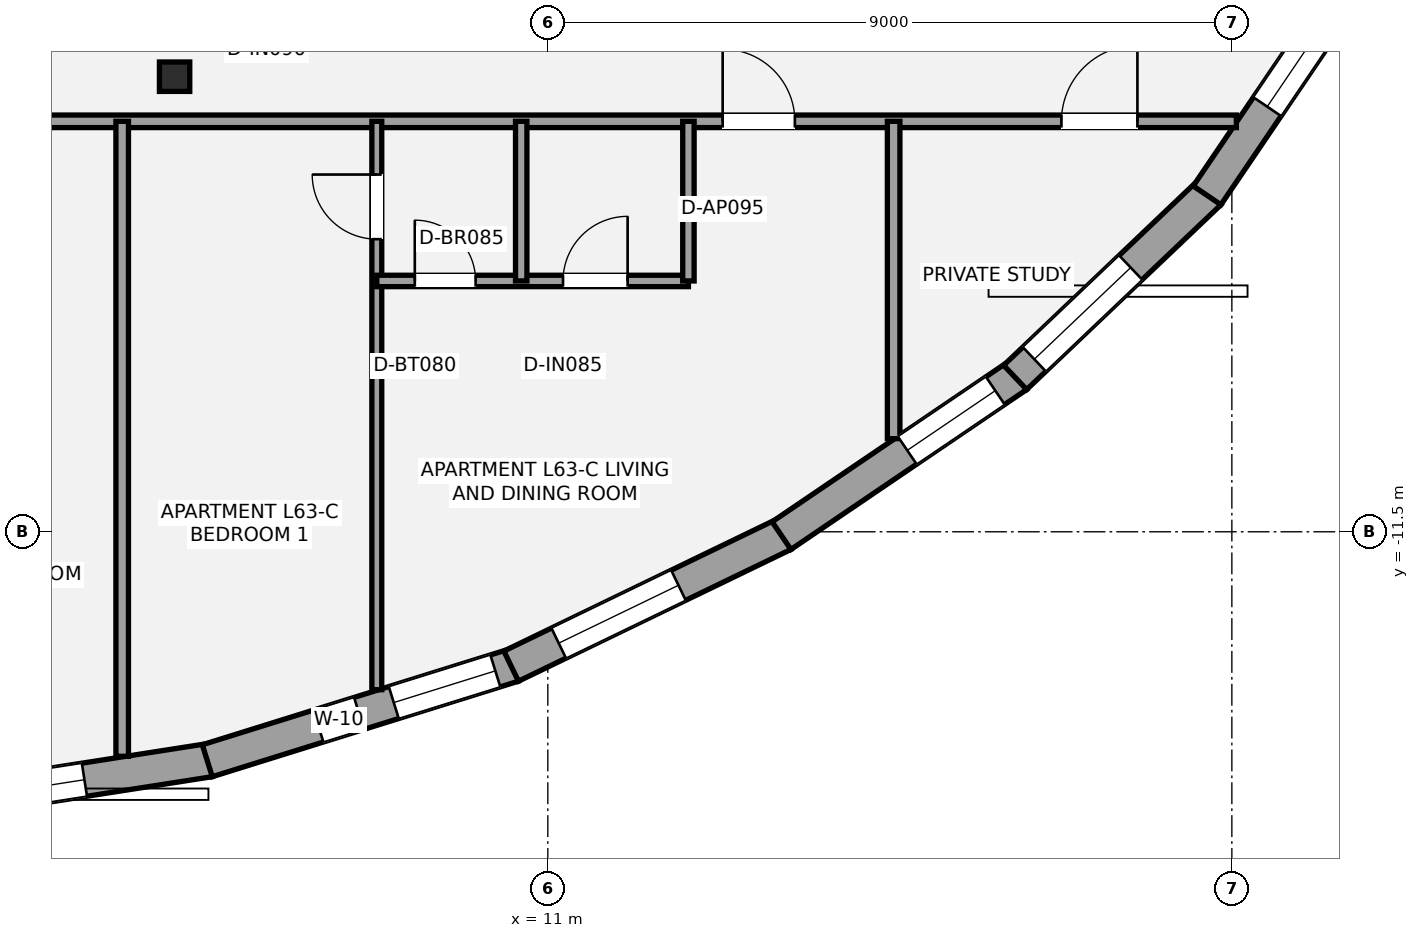
"""IFC4 building model, lengths in metres.
Left out: names, types, materials, properties, quantities, classifications, styles, units other than length and angle.
Written with IfcOpenShell. Run it as: python <this file> out.ifc"""

import sys

from ifc_helpers import new_model, si_unit, direction, frame, frame_2d, origin, origin_2d, place, context, subcontext, project, spatial, rectangle, i_section, extrude, element, fill, save


model = new_model("IFC4")
c1 = context("Model", 3, precision=1e-05, world=origin(), true_north=direction((0.0, 1.0)))
c2 = subcontext(c1, "Body", "Model", "MODEL_VIEW")
j1 = project(units=[si_unit("LENGTHUNIT", "METRE"), si_unit("PLANEANGLEUNIT", "RADIAN")], contexts=[c1])
p1 = place(None, origin())
s1 = spatial("IfcSite", under=j1, at=p1, CompositionType="ELEMENT")
p2 = place(p1, origin())
s2 = spatial("IfcBuilding", under=s1, at=p2, CompositionType="ELEMENT")
p3 = place(p2, frame((0.0, 0.0, 225.75)))
s3 = spatial("IfcBuildingStorey", under=s2, at=p3, CompositionType="ELEMENT", Elevation=225.75)
p4 = place(p3, frame((6.09, -5.513, 0.0), z_axis=(0.0, 0.0, 1.0), x_axis=(1.0, 0.0, 0.0)))
e1 = element("IfcColumn", 1, at=p4, inside=s3, PredefinedType="COLUMN", context=c2, shape_type="SweptSolid", body=[
    extrude(i_section(OverallWidth=0.399, OverallDepth=0.387, WebThickness=0.021, FlangeThickness=0.033, at=origin_2d()), origin(), (0.0, 0.0, 1.0), 3.15),
])
p5 = place(p3, frame((6.551, -14.505, 0.0), z_axis=(0.0, 0.0, 1.0), x_axis=(-0.988037139715, -0.154216116355, 0.0)))
e2 = element("IfcWall", 2, at=p5, inside=s3, PredefinedType="STANDARD", context=c2, shape_type="SweptSolid", body=[
    extrude(rectangle(XDim=4.401, YDim=0.44, at=frame_2d((2.201, 0.0))), origin(), (0.0, 0.0, 1.0), 2.336),
])
p6 = place(p5, frame((1.668, 0.0, 0.55)))
e3 = element("IfcOpeningElement", 3, at=p6, cuts=e2, PredefinedType="OPENING", context=c2, shape_type="SweptSolid", body=[
    extrude(rectangle(XDim=1.75, YDim=1.55, at=frame_2d((0.875, 0.775))), frame((0.0, 0.23, 0.0), z_axis=(0.0, -1.0, 0.0), x_axis=(1.0, 0.0, 0.0)), (0.0, 0.0, 1.0), 0.46),
])
p7 = place(p3, frame((10.548, -13.256, 0.0), z_axis=(0.0, 0.0, 1.0), x_axis=(-0.954643532685, -0.297751113352, 0.0)))
e4 = element("IfcWall", 4, at=p7, inside=s3, PredefinedType="STANDARD", context=c2, shape_type="SweptSolid", body=[
    extrude(rectangle(XDim=4.219, YDim=0.44, at=frame_2d((2.11, 0.0))), origin(), (0.0, 0.0, 1.0), 2.336),
])
p8 = place(p7, frame((0.25, 0.0, 0.55)))
e5 = element("IfcOpeningElement", 5, at=p8, cuts=e4, PredefinedType="OPENING", context=c2, shape_type="SweptSolid", body=[
    extrude(rectangle(XDim=1.4, YDim=1.55, at=frame_2d((0.7, 0.775))), frame((0.0, 0.23, 0.0), z_axis=(0.0, -1.0, 0.0), x_axis=(1.0, 0.0, 0.0)), (0.0, 0.0, 1.0), 0.46),
])
p9 = place(p7, frame((2.128, 0.0, 0.58)))
e6 = element("IfcOpeningElement", 6, at=p9, cuts=e4, PredefinedType="OPENING", context=c2, shape_type="SweptSolid", body=[
    extrude(rectangle(XDim=0.56, YDim=1.15, at=frame_2d((0.28, 0.575))), frame((0.0, 0.23, 0.0), z_axis=(0.0, -1.0, 0.0), x_axis=(1.0, 0.0, 0.0)), (0.0, 0.0, 1.0), 0.46),
])
p10 = place(p3, frame((14.103, -11.535, 0.0), z_axis=(0.0, 0.0, 1.0), x_axis=(-0.900331335269, -0.435205108808, 0.0)))
e7 = element("IfcWall", 7, at=p10, inside=s3, PredefinedType="STANDARD", context=c2, shape_type="SweptSolid", body=[
    extrude(rectangle(XDim=3.982, YDim=0.44, at=frame_2d((1.991, 0.0))), origin(), (0.0, 0.0, 1.0), 2.336),
])
p11 = place(p10, frame((1.537, 0.0, 0.55)))
e8 = element("IfcOpeningElement", 8, at=p11, cuts=e7, PredefinedType="OPENING", context=c2, shape_type="SweptSolid", body=[
    extrude(rectangle(XDim=1.75, YDim=1.55, at=frame_2d((0.875, 0.775))), frame((0.0, 0.23, 0.0), z_axis=(0.0, -1.0, 0.0), x_axis=(1.0, 0.0, 0.0)), (0.0, 0.0, 1.0), 0.46),
])
p12 = place(p3, frame((17.177, -9.447, 0.0), z_axis=(0.0, 0.0, 1.0), x_axis=(-0.827635686249, -0.561265686504, 0.0)))
e9 = element("IfcWall", 9, at=p12, inside=s3, PredefinedType="STANDARD", context=c2, shape_type="SweptSolid", body=[
    extrude(rectangle(XDim=3.749, YDim=0.44, at=frame_2d((1.875, 0.0))), origin(), (0.0, 0.0, 1.0), 2.336),
])
p13 = place(p12, frame((0.35, 0.0, 0.58)))
e10 = element("IfcOpeningElement", 10, at=p13, cuts=e9, PredefinedType="OPENING", context=c2, shape_type="SweptSolid", body=[
    extrude(rectangle(XDim=1.4, YDim=1.55, at=frame_2d((0.7, 0.775))), frame((0.0, 0.23, 0.0), z_axis=(0.0, -1.0, 0.0), x_axis=(1.0, 0.0, 0.0)), (0.0, 0.0, 1.0), 0.46),
])
p14 = place(p3, frame((19.705, -7.038, 0.0), z_axis=(0.0, 0.0, 1.0), x_axis=(-0.724503260132, -0.689271373306, 0.0)))
e11 = element("IfcWall", 11, at=p14, inside=s3, PredefinedType="STANDARD", context=c2, shape_type="SweptSolid", body=[
    extrude(rectangle(XDim=3.527, YDim=0.44, at=frame_2d((1.764, 0.0))), origin(), (0.0, 0.0, 1.0), 2.336),
])
p15 = place(p14, frame((1.43, 0.0, 0.55)))
e12 = element("IfcOpeningElement", 12, at=p15, cuts=e11, PredefinedType="OPENING", context=c2, shape_type="SweptSolid", body=[
    extrude(rectangle(XDim=1.75, YDim=1.55, at=frame_2d((0.875, 0.775))), frame((0.0, 0.23, 0.0), z_axis=(0.0, -1.0, 0.0), x_axis=(1.0, 0.0, 0.0)), (0.0, 0.0, 1.0), 0.46),
])
p16 = place(p3, frame((21.526, -4.342, 0.0), z_axis=(0.0, 0.0, 1.0), x_axis=(-0.561186647073, -0.827689281764, 0.0)))
e13 = element("IfcWall", 13, at=p16, inside=s3, PredefinedType="STANDARD", context=c2, shape_type="SweptSolid", body=[
    extrude(rectangle(XDim=3.301, YDim=0.44, at=frame_2d((1.65, 0.0))), origin(), (0.0, 0.0, 1.0), 2.336),
])
p17 = place(p16, frame((0.49, 0.0, 0.58)))
e14 = element("IfcOpeningElement", 14, at=p17, cuts=e13, PredefinedType="OPENING", context=c2, shape_type="SweptSolid", body=[
    extrude(rectangle(XDim=1.4, YDim=1.55, at=frame_2d((0.7, 0.775))), frame((0.0, 0.23, 0.0), z_axis=(0.0, -1.0, 0.0), x_axis=(1.0, 0.0, 0.0)), (0.0, 0.0, 1.0), 0.46),
])
p18 = place(p3, frame((-20.059, -6.1, 0.0), z_axis=(0.0, 0.0, 1.0), x_axis=(1.0, 0.0, 0.0)))
e15 = element("IfcWall", 15, at=p18, inside=s3, PredefinedType="PARTITIONING", context=c2, shape_type="SweptSolid", body=[
    extrude(rectangle(XDim=40.118, YDim=0.165, at=frame_2d((20.059, 0.0))), origin(), (0.0, 0.0, 1.0), 2.423),
])
p19 = place(p18, frame((1.252, 0.0, 0.0)))
e16 = element("IfcOpeningElement", 16, at=p19, cuts=e15, PredefinedType="OPENING", context=c2, shape_type="SweptSolid", body=[
    extrude(rectangle(XDim=1.0, YDim=2.15, at=frame_2d((0.5, 1.075))), frame((0.0, 0.093, 0.0), z_axis=(0.0, -1.0, 0.0), x_axis=(1.0, 0.0, 0.0)), (0.0, 0.0, 1.0), 0.185),
])
p20 = place(p18, frame((37.817, 0.0, 0.0)))
e17 = element("IfcOpeningElement", 17, at=p20, cuts=e15, PredefinedType="OPENING", context=c2, shape_type="SweptSolid", body=[
    extrude(rectangle(XDim=1.0, YDim=2.15, at=frame_2d((0.5, 1.075))), frame((0.0, 0.093, 0.0), z_axis=(0.0, -1.0, 0.0), x_axis=(1.0, 0.0, 0.0)), (0.0, 0.0, 1.0), 0.185),
])
p21 = place(p18, frame((11.75, 0.0, 0.0)))
e18 = element("IfcOpeningElement", 18, at=p21, cuts=e15, PredefinedType="OPENING", context=c2, shape_type="SweptSolid", body=[
    extrude(rectangle(XDim=0.95, YDim=2.15, at=frame_2d((0.475, 1.075))), frame((0.0, 0.093, 0.0), z_axis=(0.0, -1.0, 0.0), x_axis=(1.0, 0.0, 0.0)), (0.0, 0.0, 1.0), 0.185),
])
p22 = place(p18, frame((22.56, 0.0, 0.0)))
e19 = element("IfcOpeningElement", 19, at=p22, cuts=e15, PredefinedType="OPENING", context=c2, shape_type="SweptSolid", body=[
    extrude(rectangle(XDim=0.95, YDim=2.15, at=frame_2d((0.475, 1.075))), frame((0.0, 0.093, 0.0), z_axis=(0.0, -1.0, 0.0), x_axis=(1.0, 0.0, 0.0)), (0.0, 0.0, 1.0), 0.185),
])
p23 = place(p18, frame((33.36, 0.0, 0.0)))
e20 = element("IfcOpeningElement", 20, at=p23, cuts=e15, PredefinedType="OPENING", context=c2, shape_type="SweptSolid", body=[
    extrude(rectangle(XDim=0.95, YDim=2.15, at=frame_2d((0.475, 1.075))), frame((0.0, 0.093, 0.0), z_axis=(0.0, -1.0, 0.0), x_axis=(1.0, 0.0, 0.0)), (0.0, 0.0, 1.0), 0.185),
])
p24 = place(p3, frame((15.55, -10.275, 0.0), z_axis=(0.0, 0.0, 1.0), x_axis=(0.0, 1.0, 0.0)))
e21 = element("IfcWall", 21, at=p24, inside=s3, PredefinedType="PARTITIONING", context=c2, shape_type="SweptSolid", body=[
    extrude(rectangle(XDim=4.175, YDim=0.165, at=frame_2d((2.087, 0.0))), origin(), (0.0, 0.0, 1.0), 2.423),
])
p25 = place(p3, frame((5.4, -14.454, 0.0), z_axis=(0.0, 0.0, 1.0), x_axis=(0.0, 1.0, 0.0)))
e22 = element("IfcWall", 22, at=p25, inside=s3, PredefinedType="PARTITIONING", context=c2, shape_type="SweptSolid", body=[
    extrude(rectangle(XDim=8.354, YDim=0.165, at=frame_2d((4.177, 0.0))), origin(), (0.0, 0.0, 1.0), 2.423),
])
p26 = place(p3, frame((8.75, -13.578, 0.0), z_axis=(0.0, 0.0, 1.0), x_axis=(0.0, 1.0, 0.0)))
e23 = element("IfcWall", 23, at=p26, inside=s3, PredefinedType="PARTITIONING", context=c2, shape_type="SweptSolid", body=[
    extrude(rectangle(XDim=7.478, YDim=0.13, at=frame_2d((3.739, 0.0))), origin(), (0.0, 0.0, 1.0), 2.97),
])
p27 = place(p26, frame((5.927, 0.0, 0.0)))
e24 = element("IfcOpeningElement", 24, at=p27, cuts=e23, PredefinedType="OPENING", context=c2, shape_type="SweptSolid", body=[
    extrude(rectangle(XDim=0.85, YDim=2.1, at=frame_2d((0.425, 1.05))), frame((0.0, 0.075, 0.0), z_axis=(0.0, -1.0, 0.0), x_axis=(1.0, 0.0, 0.0)), (0.0, 0.0, 1.0), 0.15),
])
p28 = place(p3, frame((8.75, -8.2, 0.0), z_axis=(0.0, 0.0, 1.0), x_axis=(1.0, 0.0, 0.0)))
e25 = element("IfcWall", 25, at=p28, inside=s3, PredefinedType="PLUMBINGWALL", context=c2, shape_type="SweptSolid", body=[
    extrude(rectangle(XDim=4.1, YDim=0.15, at=frame_2d((2.05, 0.0))), origin(), (0.0, 0.0, 1.0), 2.423),
])
p29 = place(p28, frame((0.5, 0.0, 0.0)))
e26 = element("IfcOpeningElement", 26, at=p29, cuts=e25, PredefinedType="OPENING", context=c2, shape_type="SweptSolid", body=[
    extrude(rectangle(XDim=0.8, YDim=2.1, at=frame_2d((0.4, 1.05))), frame((0.0, 0.085, 0.0), z_axis=(0.0, -1.0, 0.0), x_axis=(1.0, 0.0, 0.0)), (0.0, 0.0, 1.0), 0.17),
])
p30 = place(p28, frame((2.45, 0.0, 0.0)))
e27 = element("IfcOpeningElement", 27, at=p30, cuts=e25, PredefinedType="OPENING", context=c2, shape_type="SweptSolid", body=[
    extrude(rectangle(XDim=0.85, YDim=2.1, at=frame_2d((0.425, 1.05))), frame((0.0, 0.085, 0.0), z_axis=(0.0, -1.0, 0.0), x_axis=(1.0, 0.0, 0.0)), (0.0, 0.0, 1.0), 0.17),
])
p31 = place(p3, frame((10.65, -8.2, 0.0), z_axis=(0.0, 0.0, 1.0), x_axis=(0.0, 1.0, 0.0)))
e28 = element("IfcWall", 28, at=p31, inside=s3, PredefinedType="PLUMBINGWALL", context=c2, shape_type="SweptSolid", body=[
    extrude(rectangle(XDim=2.1, YDim=0.15, at=frame_2d((1.05, 0.0))), origin(), (0.0, 0.0, 1.0), 2.97),
])
p32 = place(p3, frame((12.85, -8.2, 0.0), z_axis=(0.0, 0.0, 1.0), x_axis=(0.0, 1.0, 0.0)))
e29 = element("IfcWall", 29, at=p32, inside=s3, PredefinedType="PLUMBINGWALL", context=c2, shape_type="SweptSolid", body=[
    extrude(rectangle(XDim=2.1, YDim=0.15, at=frame_2d((1.05, 0.0))), origin(), (0.0, 0.0, 1.0), 2.423),
])
p33 = place(p6, origin())
e30 = element("IfcWindow", 30, at=p33, inside=s3, PartitioningType="SINGLE_PANEL", PredefinedType="WINDOW", context=c2, shape_type="SweptSolid", body=[
    extrude(rectangle(XDim=1.75, YDim=1.55, at=frame_2d((0.875, 0.775))), frame((0.0, -0.01, 0.0), z_axis=(0.0, -1.0, 0.0), x_axis=(1.0, 0.0, 0.0)), (0.0, 0.0, 1.0), 0.06),
])
fill(e3, e30)
p34 = place(p8, origin())
e31 = element("IfcWindow", 31, at=p34, inside=s3, PartitioningType="SINGLE_PANEL", PredefinedType="WINDOW", context=c2, shape_type="SweptSolid", body=[
    extrude(rectangle(XDim=1.4, YDim=1.55, at=frame_2d((0.7, 0.775))), frame((0.0, -0.01, 0.0), z_axis=(0.0, -1.0, 0.0), x_axis=(1.0, 0.0, 0.0)), (0.0, 0.0, 1.0), 0.06),
])
fill(e5, e31)
p35 = place(p11, origin())
e32 = element("IfcWindow", 32, at=p35, inside=s3, PartitioningType="SINGLE_PANEL", PredefinedType="WINDOW", context=c2, shape_type="SweptSolid", body=[
    extrude(rectangle(XDim=1.75, YDim=1.55, at=frame_2d((0.875, 0.775))), frame((0.0, -0.01, 0.0), z_axis=(0.0, -1.0, 0.0), x_axis=(1.0, 0.0, 0.0)), (0.0, 0.0, 1.0), 0.06),
])
fill(e8, e32)
p36 = place(p13, origin())
e33 = element("IfcWindow", 33, at=p36, inside=s3, PartitioningType="SINGLE_PANEL", PredefinedType="WINDOW", context=c2, shape_type="SweptSolid", body=[
    extrude(rectangle(XDim=1.4, YDim=1.55, at=frame_2d((0.7, 0.775))), frame((0.0, -0.01, 0.0), z_axis=(0.0, -1.0, 0.0), x_axis=(1.0, 0.0, 0.0)), (0.0, 0.0, 1.0), 0.06),
])
fill(e10, e33)
p37 = place(p15, origin())
e34 = element("IfcWindow", 34, at=p37, inside=s3, PartitioningType="SINGLE_PANEL", PredefinedType="WINDOW", context=c2, shape_type="SweptSolid", body=[
    extrude(rectangle(XDim=1.75, YDim=1.55, at=frame_2d((0.875, 0.775))), frame((0.0, -0.01, 0.0), z_axis=(0.0, -1.0, 0.0), x_axis=(1.0, 0.0, 0.0)), (0.0, 0.0, 1.0), 0.06),
])
fill(e12, e34)
p38 = place(p17, origin())
e35 = element("IfcWindow", 35, at=p38, inside=s3, PartitioningType="SINGLE_PANEL", PredefinedType="WINDOW", context=c2, shape_type="SweptSolid", body=[
    extrude(rectangle(XDim=1.4, YDim=1.55, at=frame_2d((0.7, 0.775))), frame((0.0, -0.01, 0.0), z_axis=(0.0, -1.0, 0.0), x_axis=(1.0, 0.0, 0.0)), (0.0, 0.0, 1.0), 0.06),
])
fill(e14, e35)
p39 = place(p9, origin())
e36 = element("IfcWindow", 36, at=p39, inside=s3, PartitioningType="SINGLE_PANEL", PredefinedType="WINDOW", context=c2, shape_type="SweptSolid", body=[
    extrude(rectangle(XDim=0.56, YDim=1.15, at=frame_2d((0.28, 0.575))), frame((0.0, -0.01, 0.0), z_axis=(0.0, -1.0, 0.0), x_axis=(1.0, 0.0, 0.0)), (0.0, 0.0, 1.0), 0.06),
])
fill(e6, e36)
p40 = place(p20, origin())
e37 = element("IfcDoor", 37, at=p40, inside=s3, OperationType="SINGLE_SWING_RIGHT", PredefinedType="DOOR", context=c2, shape_type="SweptSolid", body=[
    extrude(rectangle(XDim=1.0, YDim=2.15, at=frame_2d((0.5, 1.075))), frame((0.0, 0.025, 0.0), z_axis=(0.0, -1.0, 0.0), x_axis=(1.0, 0.0, 0.0)), (0.0, 0.0, 1.0), 0.05),
])
fill(e17, e37)
p41 = place(p27, origin())
e38 = element("IfcDoor", 38, at=p41, inside=s3, OperationType="SINGLE_SWING_RIGHT", PredefinedType="DOOR", context=c2, shape_type="SweptSolid", body=[
    extrude(rectangle(XDim=0.85, YDim=2.1, at=frame_2d((0.425, 1.05))), frame((0.0, 0.025, 0.0), z_axis=(0.0, -1.0, 0.0), x_axis=(1.0, 0.0, 0.0)), (0.0, 0.0, 1.0), 0.05),
])
fill(e24, e38)
p42 = place(p29, origin())
e39 = element("IfcDoor", 39, at=p42, inside=s3, OperationType="SINGLE_SWING_LEFT", PredefinedType="DOOR", context=c2, shape_type="SweptSolid", body=[
    extrude(rectangle(XDim=0.8, YDim=2.1, at=frame_2d((0.4, 1.05))), frame((0.0, 0.025, 0.0), z_axis=(0.0, -1.0, 0.0), x_axis=(1.0, 0.0, 0.0)), (0.0, 0.0, 1.0), 0.05),
])
fill(e26, e39)
p43 = place(p30, origin())
e40 = element("IfcDoor", 40, at=p43, inside=s3, OperationType="SINGLE_SWING_RIGHT", PredefinedType="DOOR", context=c2, shape_type="SweptSolid", body=[
    extrude(rectangle(XDim=0.85, YDim=2.1, at=frame_2d((0.425, 1.05))), frame((0.0, 0.025, 0.0), z_axis=(0.0, -1.0, 0.0), x_axis=(1.0, 0.0, 0.0)), (0.0, 0.0, 1.0), 0.05),
])
fill(e27, e40)
p44 = place(p23, origin())
e41 = element("IfcDoor", 41, at=p44, inside=s3, OperationType="SINGLE_SWING_LEFT", PredefinedType="DOOR", context=c2, shape_type="SweptSolid", body=[
    extrude(rectangle(XDim=0.95, YDim=2.15, at=frame_2d((0.475, 1.075))), frame((0.0, 0.025, 0.0), z_axis=(0.0, -1.0, 0.0), x_axis=(1.0, 0.0, 0.0)), (0.0, 0.0, 1.0), 0.05),
])
fill(e20, e41)
save(model, sys.argv[1])
